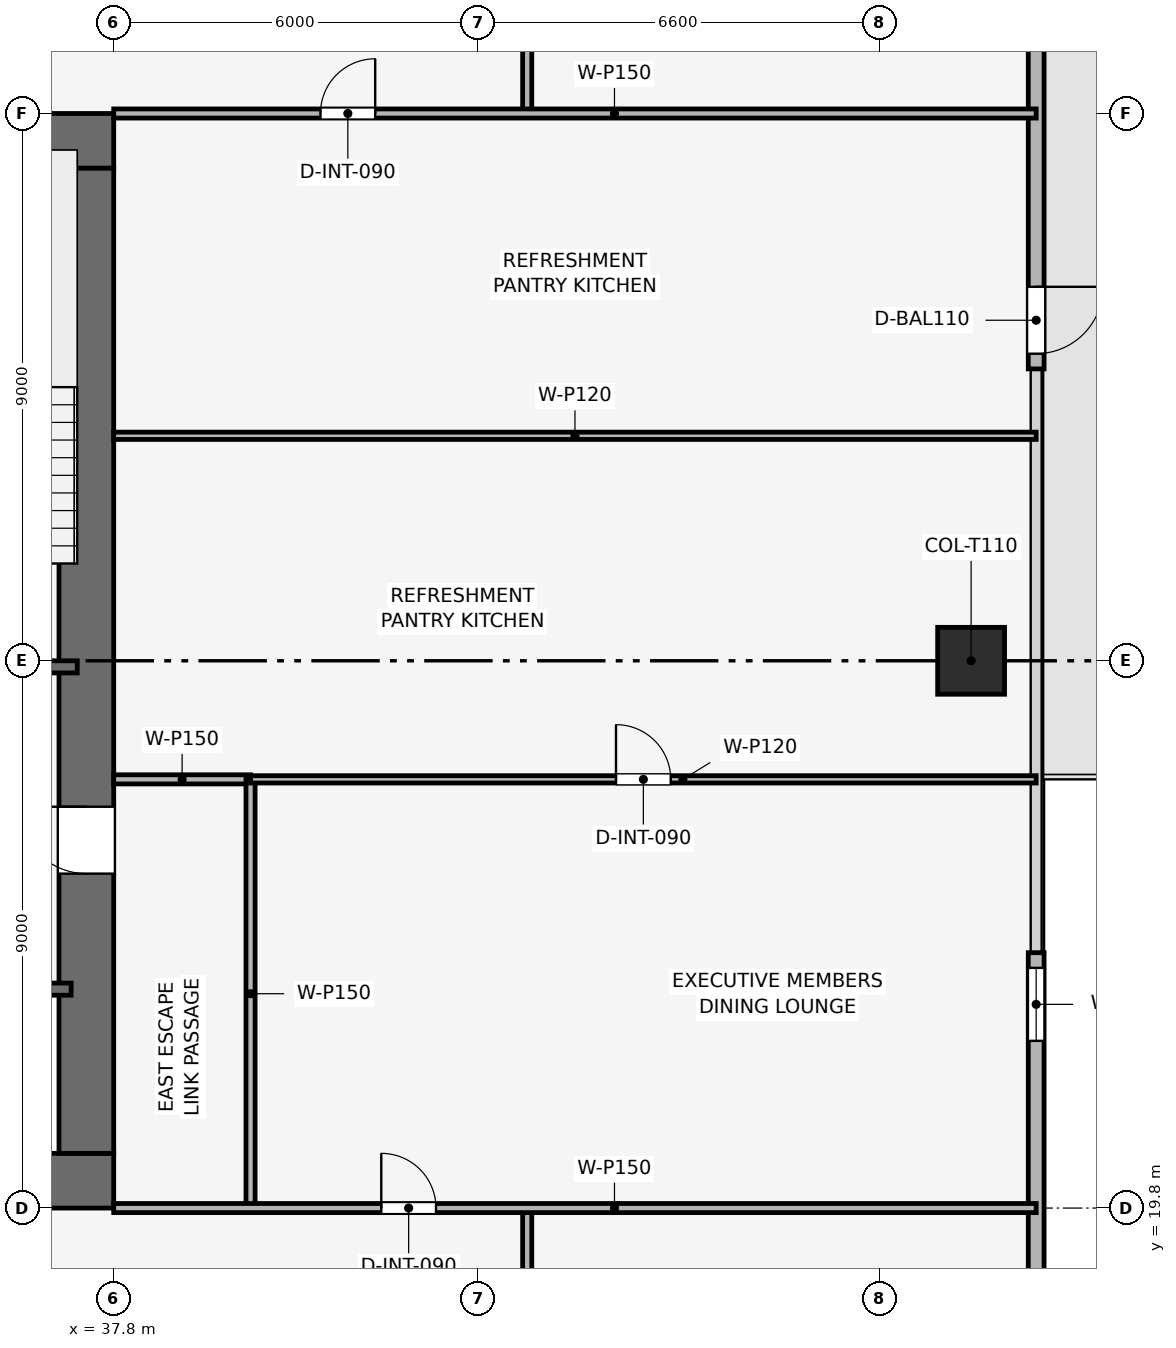
"""IFC4 building model, lengths in metres.
Left out: names, types, materials, properties, quantities, classifications, styles, units other than length and angle.
Written with IfcOpenShell. Run it as: python <this file> out.ifc"""

import sys

from ifc_helpers import new_model, si_unit, direction, frame, frame_2d, origin, origin_2d, place, context, subcontext, project, spatial, rectangle, extrude, element, fill, save


model = new_model("IFC4")
c1 = context("Model", 3, precision=1e-05, world=origin(), true_north=direction((0.0, 1.0)))
c2 = subcontext(c1, "Body", "Model", "MODEL_VIEW")
j1 = project(units=[si_unit("LENGTHUNIT", "METRE"), si_unit("PLANEANGLEUNIT", "RADIAN")], contexts=[c1])
p1 = place(None, origin())
s1 = spatial("IfcSite", under=j1, at=p1, CompositionType="ELEMENT")
p2 = place(p1, origin())
s2 = spatial("IfcBuilding", under=s1, at=p2, CompositionType="ELEMENT")
p3 = place(p2, frame((0.0, 0.0, 168.3)))
s3 = spatial("IfcBuildingStorey", under=s2, at=p3, CompositionType="ELEMENT", Elevation=168.3)
p4 = place(p3, frame((19.8, 20.25, 0.0), z_axis=(0.0, 0.0, 1.0), x_axis=(1.0, 0.0, 0.0)))
e1 = element("IfcWall", 1, at=p4, inside=s3, PredefinedType="SHEAR", context=c2, shape_type="SweptSolid", body=[
    extrude(rectangle(XDim=18.0, YDim=0.9, at=frame_2d((9.0, 0.0))), origin(), (0.0, 0.0, 1.0), 3.75),
])
p5 = place(p4, frame((8.4, 0.0, 0.0)))
e2 = element("IfcOpeningElement", 2, at=p5, cuts=e1, PredefinedType="OPENING", context=c2, shape_type="SweptSolid", body=[
    extrude(rectangle(XDim=1.2, YDim=2.2, at=frame_2d((0.6, 1.1))), frame((0.0, 0.46, 0.0), z_axis=(0.0, -1.0, 0.0), x_axis=(1.0, 0.0, 0.0)), (0.0, 0.0, 1.0), 0.92),
])
p6 = place(p3, frame((19.8, 37.35, 0.0), z_axis=(0.0, 0.0, 1.0), x_axis=(1.0, 0.0, 0.0)))
e3 = element("IfcWall", 3, at=p6, inside=s3, PredefinedType="SHEAR", context=c2, shape_type="SweptSolid", body=[
    extrude(rectangle(XDim=18.0, YDim=0.9, at=frame_2d((9.0, 0.0))), origin(), (0.0, 0.0, 1.0), 3.75),
])
p7 = place(p6, frame((7.05, 0.0, 0.0)))
e4 = element("IfcOpeningElement", 4, at=p7, cuts=e3, PredefinedType="OPENING", context=c2, shape_type="SweptSolid", body=[
    extrude(rectangle(XDim=1.1, YDim=2.15, at=frame_2d((0.55, 1.075))), frame((0.0, 0.46, 0.0), z_axis=(0.0, -1.0, 0.0), x_axis=(1.0, 0.0, 0.0)), (0.0, 0.0, 1.0), 0.92),
])
p8 = place(p3, frame((37.35, 20.7, 0.0), z_axis=(0.0, 0.0, 1.0), x_axis=(0.0, 1.0, 0.0)))
e5 = element("IfcWall", 5, at=p8, inside=s3, PredefinedType="SHEAR", context=c2, shape_type="SweptSolid", body=[
    extrude(rectangle(XDim=16.2, YDim=0.9, at=frame_2d((8.1, 0.0))), origin(), (0.0, 0.0, 1.0), 3.75),
])
p9 = place(p8, frame((4.6, 0.0, 0.0)))
e6 = element("IfcOpeningElement", 6, at=p9, cuts=e5, PredefinedType="OPENING", context=c2, shape_type="SweptSolid", body=[
    extrude(rectangle(XDim=1.1, YDim=2.15, at=frame_2d((0.55, 1.075))), frame((0.0, 0.46, 0.0), z_axis=(0.0, -1.0, 0.0), x_axis=(1.0, 0.0, 0.0)), (0.0, 0.0, 1.0), 0.92),
])
p10 = place(p3, frame((51.9, 28.8, 0.003), z_axis=(0.0, 0.0, 1.0), x_axis=(1.0, 0.0, 0.0)))
e7 = element("IfcColumn", 7, at=p10, inside=s3, PredefinedType="COLUMN", context=c2, shape_type="SweptSolid", body=[
    extrude(rectangle(XDim=1.1, YDim=1.1, at=origin_2d()), origin(), (0.0, 0.0, 1.0), 3.489),
])
p11 = place(p3, frame((52.97, 46.2, 0.0), z_axis=(0.0, 0.0, 1.0), x_axis=(0.0, -1.0, 0.0)))
e8 = element("IfcWall", 8, at=p11, inside=s3, PredefinedType="SOLIDWALL", context=c2, shape_type="SweptSolid", body=[
    extrude(rectangle(XDim=12.6, YDim=0.26, at=frame_2d((6.3, 0.0))), origin(), (0.0, 0.0, 1.0), 3.495),
])
p12 = place(p11, frame((11.25, 0.0, 0.0)))
e9 = element("IfcOpeningElement", 9, at=p12, cuts=e8, PredefinedType="OPENING", context=c2, shape_type="SweptSolid", body=[
    extrude(rectangle(XDim=1.1, YDim=2.2, at=frame_2d((0.55, 1.1))), frame((0.0, 0.14, 0.0), z_axis=(0.0, -1.0, 0.0), x_axis=(1.0, 0.0, 0.0)), (0.0, 0.0, 1.0), 0.28),
])
p13 = place(p3, frame((52.97, 24.0, 0.0), z_axis=(0.0, 0.0, 1.0), x_axis=(0.0, -1.0, 0.0)))
e10 = element("IfcWall", 10, at=p13, inside=s3, PredefinedType="SOLIDWALL", context=c2, shape_type="SweptSolid", body=[
    extrude(rectangle(XDim=12.6, YDim=0.26, at=frame_2d((6.3, 0.0))), origin(), (0.0, 0.0, 1.0), 3.495),
])
p14 = place(p13, frame((0.25, 0.0, 0.9)))
e11 = element("IfcOpeningElement", 11, at=p14, cuts=e10, PredefinedType="OPENING", context=c2, shape_type="SweptSolid", body=[
    extrude(rectangle(XDim=1.2, YDim=2.1, at=frame_2d((0.6, 1.05))), frame((0.0, 0.14, 0.0), z_axis=(0.0, -1.0, 0.0), x_axis=(1.0, 0.0, 0.0)), (0.0, 0.0, 1.0), 0.28),
])
p15 = place(p3, frame((34.05, 28.7, 0.0), z_axis=(0.0, 0.0, 1.0), x_axis=(1.0, 0.0, 0.0)))
e12 = element("IfcWall", 12, at=p15, inside=s3, PredefinedType="SHEAR", context=c2, shape_type="SweptSolid", body=[
    extrude(rectangle(XDim=3.15, YDim=0.2, at=frame_2d((1.575, 0.0))), origin(), (0.0, 0.0, 1.0), 3.495),
])
p16 = place(p15, frame((0.8, 0.0, 0.0)))
e13 = element("IfcOpeningElement", 13, at=p16, cuts=e12, PredefinedType="OPENING", context=c2, shape_type="SweptSolid", body=[
    extrude(rectangle(XDim=1.0, YDim=2.1, at=frame_2d((0.5, 1.05))), frame((0.0, 0.11, 0.0), z_axis=(0.0, -1.0, 0.0), x_axis=(1.0, 0.0, 0.0)), (0.0, 0.0, 1.0), 0.22),
])
p17 = place(p3, frame((34.05, 23.4, 0.0), z_axis=(0.0, 0.0, 1.0), x_axis=(1.0, 0.0, 0.0)))
e14 = element("IfcWall", 14, at=p17, inside=s3, PredefinedType="SHEAR", context=c2, shape_type="SweptSolid", body=[
    extrude(rectangle(XDim=3.05, YDim=0.2, at=frame_2d((1.525, 0.0))), origin(), (0.0, 0.0, 1.0), 3.495),
])
p18 = place(p17, frame((1.2, 0.0, 0.0)))
e15 = element("IfcOpeningElement", 15, at=p18, cuts=e14, PredefinedType="OPENING", context=c2, shape_type="SweptSolid", body=[
    extrude(rectangle(XDim=1.1, YDim=2.15, at=frame_2d((0.55, 1.075))), frame((0.0, 0.11, 0.0), z_axis=(0.0, -1.0, 0.0), x_axis=(1.0, 0.0, 0.0)), (0.0, 0.0, 1.0), 0.22),
])
p19 = place(p3, frame((37.8, 26.85, 0.0), z_axis=(0.0, 0.0, 1.0), x_axis=(1.0, 0.0, 0.0)))
e16 = element("IfcWall", 16, at=p19, inside=s3, PredefinedType="PARTITIONING", context=c2, shape_type="SweptSolid", body=[
    extrude(rectangle(XDim=2.25, YDim=0.15, at=frame_2d((1.125, 0.0))), origin(), (0.0, 0.0, 1.0), 3.495),
])
p20 = place(p3, frame((40.05, 19.8, 0.0), z_axis=(0.0, 0.0, 1.0), x_axis=(0.0, 1.0, 0.0)))
e17 = element("IfcWall", 17, at=p20, inside=s3, PredefinedType="PARTITIONING", context=c2, shape_type="SweptSolid", body=[
    extrude(rectangle(XDim=7.05, YDim=0.15, at=frame_2d((3.525, 0.0))), origin(), (0.0, 0.0, 1.0), 3.03),
])
p21 = place(p3, frame((40.05, 26.85, 0.0), z_axis=(0.0, 0.0, 1.0), x_axis=(1.0, 0.0, 0.0)))
e18 = element("IfcWall", 18, at=p21, inside=s3, PredefinedType="PARTITIONING", context=c2, shape_type="SweptSolid", body=[
    extrude(rectangle(XDim=12.92, YDim=0.12, at=frame_2d((6.46, 0.0))), origin(), (0.0, 0.0, 1.0), 2.98),
])
p22 = place(p21, frame((6.01, 0.0, 0.0)))
e19 = element("IfcOpeningElement", 19, at=p22, cuts=e18, PredefinedType="OPENING", context=c2, shape_type="SweptSolid", body=[
    extrude(rectangle(XDim=0.9, YDim=2.1, at=frame_2d((0.45, 1.05))), frame((0.0, 0.07, 0.0), z_axis=(0.0, -1.0, 0.0), x_axis=(1.0, 0.0, 0.0)), (0.0, 0.0, 1.0), 0.14),
])
p23 = place(p3, frame((37.8, 32.5, 0.0), z_axis=(0.0, 0.0, 1.0), x_axis=(1.0, 0.0, 0.0)))
e20 = element("IfcWall", 20, at=p23, inside=s3, PredefinedType="PARTITIONING", context=c2, shape_type="SweptSolid", body=[
    extrude(rectangle(XDim=15.17, YDim=0.12, at=frame_2d((7.585, 0.0))), origin(), (0.0, 0.0, 1.0), 2.98),
])
p24 = place(p3, frame((44.6, 17.4, 0.0), z_axis=(0.0, 0.0, 1.0), x_axis=(0.0, 1.0, 0.0)))
e21 = element("IfcWall", 21, at=p24, inside=s3, PredefinedType="PARTITIONING", context=c2, shape_type="SweptSolid", body=[
    extrude(rectangle(XDim=2.4, YDim=0.15, at=frame_2d((1.2, 0.0))), origin(), (0.0, 0.0, 1.0), 3.495),
])
p25 = place(p3, frame((44.6, 37.8, 0.0), z_axis=(0.0, 0.0, 1.0), x_axis=(0.0, 1.0, 0.0)))
e22 = element("IfcWall", 22, at=p25, inside=s3, PredefinedType="PARTITIONING", context=c2, shape_type="SweptSolid", body=[
    extrude(rectangle(XDim=2.4, YDim=0.15, at=frame_2d((1.2, 0.0))), origin(), (0.0, 0.0, 1.0), 3.495),
])
p26 = place(p3, frame((37.8, 19.8, 0.0), z_axis=(0.0, 0.0, 1.0), x_axis=(1.0, 0.0, 0.0)))
e23 = element("IfcWall", 23, at=p26, inside=s3, PredefinedType="PARTITIONING", context=c2, shape_type="SweptSolid", body=[
    extrude(rectangle(XDim=15.17, YDim=0.15, at=frame_2d((7.585, 0.0))), origin(), (0.0, 0.0, 1.0), 2.98),
])
p27 = place(p26, frame((4.4, 0.0, 0.0)))
e24 = element("IfcOpeningElement", 24, at=p27, cuts=e23, PredefinedType="OPENING", context=c2, shape_type="SweptSolid", body=[
    extrude(rectangle(XDim=0.9, YDim=2.1, at=frame_2d((0.45, 1.05))), frame((0.0, 0.085, 0.0), z_axis=(0.0, -1.0, 0.0), x_axis=(1.0, 0.0, 0.0)), (0.0, 0.0, 1.0), 0.17),
])
p28 = place(p3, frame((37.8, 37.8, 0.0), z_axis=(0.0, 0.0, 1.0), x_axis=(1.0, 0.0, 0.0)))
e25 = element("IfcWall", 25, at=p28, inside=s3, PredefinedType="PARTITIONING", context=c2, shape_type="SweptSolid", body=[
    extrude(rectangle(XDim=15.17, YDim=0.15, at=frame_2d((7.585, 0.0))), origin(), (0.0, 0.0, 1.0), 2.98),
])
p29 = place(p28, frame((3.4, 0.0, 0.0)))
e26 = element("IfcOpeningElement", 26, at=p29, cuts=e25, PredefinedType="OPENING", context=c2, shape_type="SweptSolid", body=[
    extrude(rectangle(XDim=0.9, YDim=2.1, at=frame_2d((0.45, 1.05))), frame((0.0, 0.085, 0.0), z_axis=(0.0, -1.0, 0.0), x_axis=(1.0, 0.0, 0.0)), (0.0, 0.0, 1.0), 0.17),
])
p30 = place(p12, origin())
e27 = element("IfcDoor", 27, at=p30, inside=s3, OperationType="SINGLE_SWING_LEFT", PredefinedType="DOOR", context=c2, shape_type="SweptSolid", body=[
    extrude(rectangle(XDim=1.1, YDim=2.2, at=frame_2d((0.55, 1.1))), frame((0.0, 0.025, 0.0), z_axis=(0.0, -1.0, 0.0), x_axis=(1.0, 0.0, 0.0)), (0.0, 0.0, 1.0), 0.05),
])
fill(e9, e27)
p31 = place(p14, origin())
e28 = element("IfcWindow", 28, at=p31, inside=s3, PartitioningType="SINGLE_PANEL", PredefinedType="WINDOW", context=c2, shape_type="SweptSolid", body=[
    extrude(rectangle(XDim=1.2, YDim=2.1, at=frame_2d((0.6, 1.05))), frame((0.0, 0.03, 0.0), z_axis=(0.0, -1.0, 0.0), x_axis=(1.0, 0.0, 0.0)), (0.0, 0.0, 1.0), 0.06),
])
fill(e11, e28)
p32 = place(p22, origin())
e29 = element("IfcDoor", 29, at=p32, inside=s3, OperationType="SINGLE_SWING_LEFT", PredefinedType="DOOR", context=c2, shape_type="SweptSolid", body=[
    extrude(rectangle(XDim=0.9, YDim=2.1, at=frame_2d((0.45, 1.05))), frame((0.0, 0.025, 0.0), z_axis=(0.0, -1.0, 0.0), x_axis=(1.0, 0.0, 0.0)), (0.0, 0.0, 1.0), 0.05),
])
fill(e19, e29)
p33 = place(p27, origin())
e30 = element("IfcDoor", 30, at=p33, inside=s3, OperationType="SINGLE_SWING_LEFT", PredefinedType="DOOR", context=c2, shape_type="SweptSolid", body=[
    extrude(rectangle(XDim=0.9, YDim=2.1, at=frame_2d((0.45, 1.05))), frame((0.0, 0.025, 0.0), z_axis=(0.0, -1.0, 0.0), x_axis=(1.0, 0.0, 0.0)), (0.0, 0.0, 1.0), 0.05),
])
fill(e24, e30)
p34 = place(p29, origin())
e31 = element("IfcDoor", 31, at=p34, inside=s3, OperationType="SINGLE_SWING_RIGHT", PredefinedType="DOOR", context=c2, shape_type="SweptSolid", body=[
    extrude(rectangle(XDim=0.9, YDim=2.1, at=frame_2d((0.45, 1.05))), frame((0.0, 0.025, 0.0), z_axis=(0.0, -1.0, 0.0), x_axis=(1.0, 0.0, 0.0)), (0.0, 0.0, 1.0), 0.05),
])
fill(e26, e31)
p35 = place(p9, origin())
e32 = element("IfcDoor", 32, at=p35, inside=s3, OperationType="SINGLE_SWING_RIGHT", PredefinedType="DOOR", context=c2, shape_type="SweptSolid", body=[
    extrude(rectangle(XDim=1.1, YDim=2.15, at=frame_2d((0.55, 1.075))), frame((0.0, 0.025, 0.0), z_axis=(0.0, -1.0, 0.0), x_axis=(1.0, 0.0, 0.0)), (0.0, 0.0, 1.0), 0.05),
])
fill(e6, e32)
save(model, sys.argv[1])
